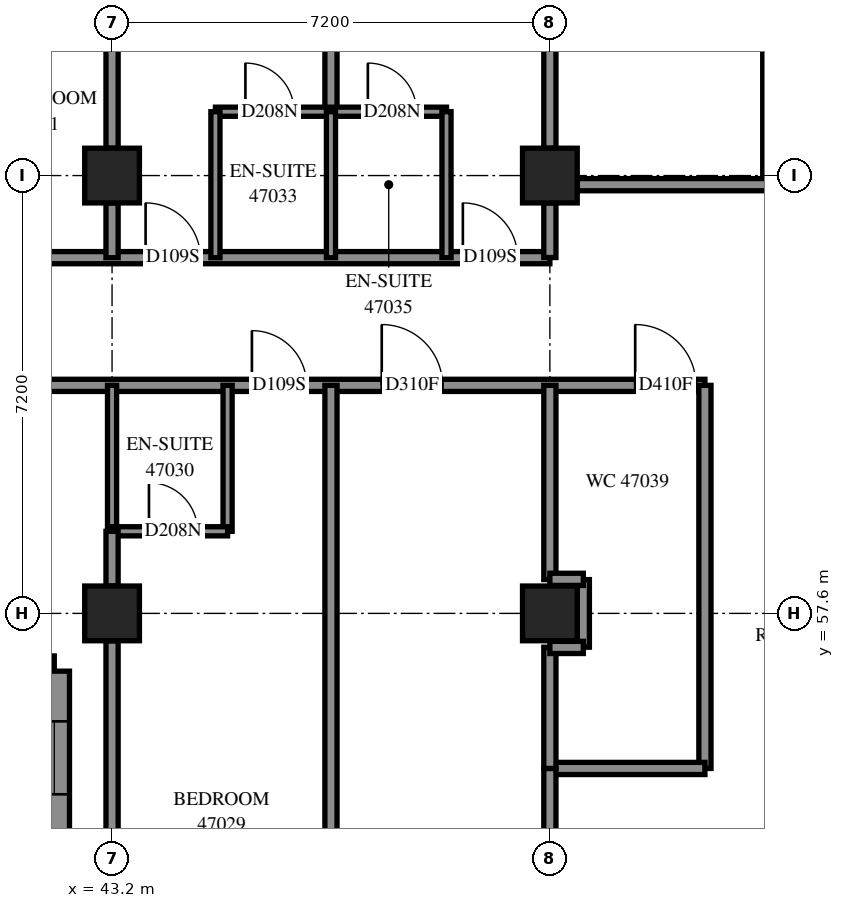
"""IFC4 building model, lengths in metres.
Left out: names, types, materials, properties, quantities, classifications, styles, units other than length and angle.
Written with IfcOpenShell. Run it as: python <this file> out.ifc"""

import sys

from ifc_helpers import new_model, si_unit, direction, frame, frame_2d, origin, origin_2d, place, context, subcontext, project, spatial, polyline, rectangle, outline, extrude, element, fill, save


model = new_model("IFC4")
c1 = context("Model", 3, precision=1e-05, world=origin(), true_north=direction((0.0, 1.0)))
c2 = subcontext(c1, "Body", "Model", "MODEL_VIEW")
j1 = project(units=[si_unit("LENGTHUNIT", "METRE"), si_unit("PLANEANGLEUNIT", "RADIAN")], contexts=[c1])
p1 = place(None, origin())
s1 = spatial("IfcSite", under=j1, at=p1, CompositionType="ELEMENT")
p2 = place(p1, origin())
s2 = spatial("IfcBuilding", under=s1, at=p2, CompositionType="ELEMENT")
p3 = place(p2, frame((0.0, 0.0, 172.8)))
s3 = spatial("IfcBuildingStorey", under=s2, at=p3, CompositionType="ELEMENT", Elevation=172.8)
for number, where, z_axis, x_axis in (
    (1, (43.2, 57.6, 0.0), (0.0, 0.0, 1.0), (1.0, 0.0, 0.0)),
    (2, (43.2, 64.8, 0.0), (0.0, 0.0, 1.0), (1.0, 0.0, 0.0)),
    (3, (50.4, 57.6, 0.0), (0.0, 0.0, 1.0), (1.0, 0.0, 0.0)),
    (4, (50.4, 64.8, 0.0), (0.0, 0.0, 1.0), (1.0, 0.0, 0.0)),
):
    element("IfcColumn", number, at=place(p3, frame(where, z_axis=z_axis, x_axis=x_axis)), inside=s3, PredefinedType="COLUMN", context=c2, shape_type="SweptSolid", body=[
        extrude(rectangle(XDim=0.9, YDim=0.9, at=origin_2d()), origin(), (0.0, 0.0, 1.0), 3.1),
    ])
p4 = place(p3, frame((35.05, 56.65, 0.0), z_axis=(0.0, 0.0, 1.0), x_axis=(1.0, 0.0, 0.0)))
e5 = element("IfcWall", 5, at=p4, inside=s3, PredefinedType="SOLIDWALL", context=c2, shape_type="SweptSolid", body=[
    extrude(outline(polyline([(-0.25, -0.25), (6.95, -0.25), (7.45, 0.25), (0.25, 0.25), (-0.25, -0.25)])), origin(), (0.0, 0.0, 1.0), 3.1),
])
p5 = place(p4, frame((1.35, 0.0, 0.45)))
e6 = element("IfcOpeningElement", 6, at=p5, cuts=e5, PredefinedType="OPENING", context=c2, shape_type="SweptSolid", body=[
    extrude(rectangle(XDim=2.8, YDim=2.5, at=frame_2d((1.4, 1.25))), frame((0.0, 0.26, 0.0), z_axis=(0.0, -1.0, 0.0), x_axis=(1.0, 0.0, 0.0)), (0.0, 0.0, 1.0), 0.52),
])
p6 = place(p4, frame((5.175, 0.0, 0.45)))
e7 = element("IfcOpeningElement", 7, at=p6, cuts=e5, PredefinedType="OPENING", context=c2, shape_type="SweptSolid", body=[
    extrude(rectangle(XDim=1.2, YDim=2.5, at=frame_2d((0.6, 1.25))), frame((0.0, 0.26, 0.0), z_axis=(0.0, -1.0, 0.0), x_axis=(1.0, 0.0, 0.0)), (0.0, 0.0, 1.0), 0.52),
])
p7 = place(p3, frame((42.25, 56.65, 0.0), z_axis=(0.0, 0.0, 1.0), x_axis=(0.0, -1.0, 0.0)))
e8 = element("IfcWall", 8, at=p7, inside=s3, PredefinedType="SOLIDWALL", context=c2, shape_type="SweptSolid", body=[
    extrude(outline(polyline([(0.25, -0.25), (7.45, -0.25), (6.95, 0.25), (-0.25, 0.25), (0.25, -0.25)])), origin(), (0.0, 0.0, 1.0), 3.1),
])
p8 = place(p7, frame((3.05, 0.0, 0.45)))
e9 = element("IfcOpeningElement", 9, at=p8, cuts=e8, PredefinedType="OPENING", context=c2, shape_type="SweptSolid", body=[
    extrude(rectangle(XDim=2.8, YDim=2.5, at=frame_2d((1.4, 1.25))), frame((0.0, 0.26, 0.0), z_axis=(0.0, -1.0, 0.0), x_axis=(1.0, 0.0, 0.0)), (0.0, 0.0, 1.0), 0.52),
])
p9 = place(p7, frame((0.825, 0.0, 0.45)))
e10 = element("IfcOpeningElement", 10, at=p9, cuts=e8, PredefinedType="OPENING", context=c2, shape_type="SweptSolid", body=[
    extrude(rectangle(XDim=1.2, YDim=2.5, at=frame_2d((0.6, 1.25))), frame((0.0, 0.26, 0.0), z_axis=(0.0, -1.0, 0.0), x_axis=(1.0, 0.0, 0.0)), (0.0, 0.0, 1.0), 0.52),
])
p10 = place(p3, frame((36.0, 61.35, 0.0), z_axis=(0.0, 0.0, 1.0), x_axis=(1.0, 0.0, 0.0)))
e11 = element("IfcWall", 11, at=p10, inside=s3, PredefinedType="PARTITIONING", context=c2, shape_type="SweptSolid", body=[
    extrude(rectangle(XDim=16.95, YDim=0.2, at=frame_2d((8.475, 0.0))), origin(), (0.0, 0.0, 1.0), 3.1),
])
p11 = place(p10, frame((2.3, 0.0, 0.0)))
e12 = element("IfcOpeningElement", 12, at=p11, cuts=e11, PredefinedType="OPENING", context=c2, shape_type="SweptSolid", body=[
    extrude(rectangle(XDim=0.9, YDim=2.1, at=frame_2d((0.45, 1.05))), frame((0.0, 0.11, 0.0), z_axis=(0.0, -1.0, 0.0), x_axis=(1.0, 0.0, 0.0)), (0.0, 0.0, 1.0), 0.22),
])
p12 = place(p10, frame((4.125, 0.0, 0.0)))
e13 = element("IfcOpeningElement", 13, at=p12, cuts=e11, PredefinedType="OPENING", context=c2, shape_type="SweptSolid", body=[
    extrude(rectangle(XDim=1.0, YDim=2.1, at=frame_2d((0.5, 1.05))), frame((0.0, 0.11, 0.0), z_axis=(0.0, -1.0, 0.0), x_axis=(1.0, 0.0, 0.0)), (0.0, 0.0, 1.0), 0.22),
])
p13 = place(p10, frame((9.5, 0.0, 0.0)))
e14 = element("IfcOpeningElement", 14, at=p13, cuts=e11, PredefinedType="OPENING", context=c2, shape_type="SweptSolid", body=[
    extrude(rectangle(XDim=0.9, YDim=2.1, at=frame_2d((0.45, 1.05))), frame((0.0, 0.11, 0.0), z_axis=(0.0, -1.0, 0.0), x_axis=(1.0, 0.0, 0.0)), (0.0, 0.0, 1.0), 0.22),
])
p14 = place(p10, frame((11.635, 0.0, 0.0)))
e15 = element("IfcOpeningElement", 15, at=p14, cuts=e11, PredefinedType="OPENING", context=c2, shape_type="SweptSolid", body=[
    extrude(rectangle(XDim=1.0, YDim=2.1, at=frame_2d((0.5, 1.05))), frame((0.0, 0.11, 0.0), z_axis=(0.0, -1.0, 0.0), x_axis=(1.0, 0.0, 0.0)), (0.0, 0.0, 1.0), 0.22),
])
p15 = place(p10, frame((15.803, 0.0, 0.0)))
e16 = element("IfcOpeningElement", 16, at=p15, cuts=e11, PredefinedType="OPENING", context=c2, shape_type="SweptSolid", body=[
    extrude(rectangle(XDim=1.0, YDim=2.1, at=frame_2d((0.5, 1.05))), frame((0.0, 0.11, 0.0), z_axis=(0.0, -1.0, 0.0), x_axis=(1.0, 0.0, 0.0)), (0.0, 0.0, 1.0), 0.22),
])
p16 = place(p3, frame((46.8, 49.7, 0.0), z_axis=(0.0, 0.0, 1.0), x_axis=(0.0, 1.0, 0.0)))
e17 = element("IfcWall", 17, at=p16, inside=s3, PredefinedType="PARTITIONING", context=c2, shape_type="SweptSolid", body=[
    extrude(rectangle(XDim=11.65, YDim=0.2, at=frame_2d((5.825, 0.0))), origin(), (0.0, 0.0, 1.0), 3.1),
])
p17 = place(p3, frame((40.65, 63.45, 0.0), z_axis=(0.0, 0.0, 1.0), x_axis=(1.0, 0.0, 0.0)))
e18 = element("IfcWall", 18, at=p17, inside=s3, PredefinedType="PARTITIONING", context=c2, shape_type="SweptSolid", body=[
    extrude(rectangle(XDim=9.75, YDim=0.2, at=frame_2d((4.875, 0.0))), origin(), (0.0, 0.0, 1.0), 3.1),
])
p18 = place(p17, frame((0.144, 0.0, 0.0)))
e19 = element("IfcOpeningElement", 19, at=p18, cuts=e18, PredefinedType="OPENING", context=c2, shape_type="SweptSolid", body=[
    extrude(rectangle(XDim=1.0, YDim=2.1, at=frame_2d((0.5, 1.05))), frame((0.0, 0.11, 0.0), z_axis=(0.0, -1.0, 0.0), x_axis=(1.0, 0.0, 0.0)), (0.0, 0.0, 1.0), 0.22),
])
p19 = place(p17, frame((3.102, 0.0, 0.0)))
e20 = element("IfcOpeningElement", 20, at=p19, cuts=e18, PredefinedType="OPENING", context=c2, shape_type="SweptSolid", body=[
    extrude(rectangle(XDim=0.9, YDim=2.1, at=frame_2d((0.45, 1.05))), frame((0.0, 0.11, 0.0), z_axis=(0.0, -1.0, 0.0), x_axis=(1.0, 0.0, 0.0)), (0.0, 0.0, 1.0), 0.22),
])
p20 = place(p17, frame((8.319, 0.0, 0.0)))
e21 = element("IfcOpeningElement", 21, at=p20, cuts=e18, PredefinedType="OPENING", context=c2, shape_type="SweptSolid", body=[
    extrude(rectangle(XDim=0.9, YDim=2.1, at=frame_2d((0.45, 1.05))), frame((0.0, 0.11, 0.0), z_axis=(0.0, -1.0, 0.0), x_axis=(1.0, 0.0, 0.0)), (0.0, 0.0, 1.0), 0.22),
])
p21 = place(p3, frame((54.0, 64.65, 0.0), z_axis=(0.0, 0.0, 1.0), x_axis=(0.0, 1.0, 0.0)))
e22 = element("IfcWall", 22, at=p21, inside=s3, PredefinedType="PARTITIONING", context=c2, shape_type="SweptSolid", body=[
    extrude(rectangle(XDim=8.126, YDim=0.2, at=frame_2d((4.063, 0.0))), origin(), (0.0, 0.0, 1.0), 3.1),
])
p22 = place(p3, frame((46.8, 65.85, 0.0), z_axis=(0.0, 0.0, 1.0), x_axis=(0.0, 1.0, 0.0)))
e23 = element("IfcWall", 23, at=p22, inside=s3, PredefinedType="PARTITIONING", context=c2, shape_type="SweptSolid", body=[
    extrude(rectangle(XDim=6.997, YDim=0.2, at=frame_2d((3.499, 0.0))), origin(), (0.0, 0.0, 1.0), 3.1),
])
p23 = place(p3, frame((52.95, 55.05, 0.0), z_axis=(0.0, 0.0, 1.0), x_axis=(0.0, 1.0, 0.0)))
e24 = element("IfcWall", 24, at=p23, inside=s3, PredefinedType="PARTITIONING", context=c2, shape_type="SweptSolid", body=[
    extrude(rectangle(XDim=6.3, YDim=0.2, at=frame_2d((3.15, 0.0))), origin(), (0.0, 0.0, 1.0), 3.1),
])
p24 = place(p3, frame((43.2, 50.85, 0.0), z_axis=(0.0, 0.0, 1.0), x_axis=(0.0, 1.0, 0.0)))
e25 = element("IfcWall", 25, at=p24, inside=s3, PredefinedType="PARTITIONING", context=c2, shape_type="SweptSolid", body=[
    extrude(rectangle(XDim=6.3, YDim=0.2, at=frame_2d((3.15, 0.0))), origin(), (0.0, 0.0, 1.0), 2.6),
])
for number, where, z_axis, x_axis in (
    (26, (43.2, 65.25, 0.0), (0.0, 0.0, 1.0), (0.0, 1.0, 0.0)),
    (27, (50.4, 65.25, 0.0), (0.0, 0.0, 1.0), (0.0, 1.0, 0.0)),
):
    element("IfcWall", number, at=place(p3, frame(where, z_axis=z_axis, x_axis=x_axis)), inside=s3, PredefinedType="PARTITIONING", context=c2, shape_type="SweptSolid", body=[
        extrude(rectangle(XDim=6.3, YDim=0.2, at=frame_2d((3.15, 0.0))), origin(), (0.0, 0.0, 1.0), 3.1),
    ])
p25 = place(p3, frame((50.85, 64.65, 0.0), z_axis=(0.0, 0.0, 1.0), x_axis=(1.0, 0.0, 0.0)))
e28 = element("IfcWall", 28, at=p25, inside=s3, PredefinedType="PARTITIONING", context=c2, shape_type="SweptSolid", body=[
    extrude(rectangle(XDim=4.65, YDim=0.2, at=frame_2d((2.325, 0.0))), origin(), (0.0, 0.0, 1.0), 3.1),
])
p26 = place(p25, frame((3.509, 0.0, 0.0)))
e29 = element("IfcOpeningElement", 29, at=p26, cuts=e28, PredefinedType="OPENING", context=c2, shape_type="SweptSolid", body=[
    extrude(rectangle(XDim=1.0, YDim=2.1, at=frame_2d((0.5, 1.05))), frame((0.0, 0.11, 0.0), z_axis=(0.0, -1.0, 0.0), x_axis=(1.0, 0.0, 0.0)), (0.0, 0.0, 1.0), 0.22),
])
p27 = place(p3, frame((44.9, 65.85, 0.0), z_axis=(0.0, 0.0, 1.0), x_axis=(1.0, 0.0, 0.0)))
e30 = element("IfcWall", 30, at=p27, inside=s3, PredefinedType="PARTITIONING", context=c2, shape_type="SweptSolid", body=[
    extrude(rectangle(XDim=3.8, YDim=0.15, at=frame_2d((1.9, 0.0))), origin(), (0.0, 0.0, 1.0), 3.1),
])
p28 = place(p27, frame((0.493, 0.0, 0.0)))
e31 = element("IfcOpeningElement", 31, at=p28, cuts=e30, PredefinedType="OPENING", context=c2, shape_type="SweptSolid", body=[
    extrude(rectangle(XDim=0.8, YDim=2.1, at=frame_2d((0.4, 1.05))), frame((0.0, 0.085, 0.0), z_axis=(0.0, -1.0, 0.0), x_axis=(1.0, 0.0, 0.0)), (0.0, 0.0, 1.0), 0.17),
])
p29 = place(p27, frame((2.507, 0.0, 0.0)))
e32 = element("IfcOpeningElement", 32, at=p29, cuts=e30, PredefinedType="OPENING", context=c2, shape_type="SweptSolid", body=[
    extrude(rectangle(XDim=0.8, YDim=2.1, at=frame_2d((0.4, 1.05))), frame((0.0, 0.085, 0.0), z_axis=(0.0, -1.0, 0.0), x_axis=(1.0, 0.0, 0.0)), (0.0, 0.0, 1.0), 0.17),
])
p30 = place(p3, frame((50.4, 58.156, 0.0), z_axis=(0.0, 0.0, 1.0), x_axis=(0.0, 1.0, 0.0)))
e33 = element("IfcWall", 33, at=p30, inside=s3, PredefinedType="PARTITIONING", context=c2, shape_type="SweptSolid", body=[
    extrude(rectangle(XDim=3.194, YDim=0.2, at=frame_2d((1.597, 0.0))), origin(), (0.0, 0.0, 1.0), 3.1),
])
p31 = place(p3, frame((50.4, 55.05, 0.0), z_axis=(0.0, 0.0, 1.0), x_axis=(1.0, 0.0, 0.0)))
e34 = element("IfcWall", 34, at=p31, inside=s3, PredefinedType="PARTITIONING", context=c2, shape_type="SweptSolid", body=[
    extrude(rectangle(XDim=2.55, YDim=0.2, at=frame_2d((1.275, 0.0))), origin(), (0.0, 0.0, 1.0), 3.1),
])
for number, where, z_axis, x_axis in (
    (35, (45.1, 58.95, 0.0), (0.0, 0.0, 1.0), (0.0, 1.0, 0.0)),
    (36, (43.2, 58.95, 0.0), (0.0, 0.0, 1.0), (0.0, 1.0, 0.0)),
    (37, (44.9, 63.45, 0.0), (0.0, 0.0, 1.0), (0.0, 1.0, 0.0)),
    (38, (46.8, 63.45, 0.0), (0.0, 0.0, 1.0), (0.0, 1.0, 0.0)),
    (39, (48.7, 63.45, 0.0), (0.0, 0.0, 1.0), (0.0, 1.0, 0.0)),
):
    element("IfcWall", number, at=place(p3, frame(where, z_axis=z_axis, x_axis=x_axis)), inside=s3, PredefinedType="PARTITIONING", context=c2, shape_type="SweptSolid", body=[
        extrude(rectangle(XDim=2.4, YDim=0.15, at=frame_2d((1.2, 0.0))), origin(), (0.0, 0.0, 1.0), 3.1),
    ])
p32 = place(p3, frame((50.4, 52.95, 0.0), z_axis=(0.0, 0.0, 1.0), x_axis=(0.0, 1.0, 0.0)))
e40 = element("IfcWall", 40, at=p32, inside=s3, PredefinedType="PARTITIONING", context=c2, shape_type="SweptSolid", body=[
    extrude(rectangle(XDim=2.1, YDim=0.2, at=frame_2d((1.05, 0.0))), origin(), (0.0, 0.0, 1.0), 3.1),
])
p33 = place(p3, frame((50.4, 55.05, 0.0), z_axis=(0.0, 0.0, 1.0), x_axis=(0.0, 1.0, 0.0)))
e41 = element("IfcWall", 41, at=p33, inside=s3, PredefinedType="PARTITIONING", context=c2, shape_type="SweptSolid", body=[
    extrude(rectangle(XDim=1.994, YDim=0.2, at=frame_2d((0.997, 0.0))), origin(), (0.0, 0.0, 1.0), 3.1),
])
p34 = place(p3, frame((43.2, 58.95, 0.0), z_axis=(0.0, 0.0, 1.0), x_axis=(1.0, 0.0, 0.0)))
e42 = element("IfcWall", 42, at=p34, inside=s3, PredefinedType="PARTITIONING", context=c2, shape_type="SweptSolid", body=[
    extrude(rectangle(XDim=1.9, YDim=0.15, at=frame_2d((0.95, 0.0))), origin(), (0.0, 0.0, 1.0), 3.1),
])
p35 = place(p34, frame((0.607, 0.0, 0.0)))
e43 = element("IfcOpeningElement", 43, at=p35, cuts=e42, PredefinedType="OPENING", context=c2, shape_type="SweptSolid", body=[
    extrude(rectangle(XDim=0.8, YDim=2.1, at=frame_2d((0.4, 1.05))), frame((0.0, 0.085, 0.0), z_axis=(0.0, -1.0, 0.0), x_axis=(1.0, 0.0, 0.0)), (0.0, 0.0, 1.0), 0.17),
])
p36 = place(p3, frame((50.95, 57.044, 0.0), z_axis=(0.0, 0.0, 1.0), x_axis=(0.0, 1.0, 0.0)))
e44 = element("IfcWall", 44, at=p36, inside=s3, PredefinedType="PARTITIONING", context=c2, shape_type="SweptSolid", body=[
    extrude(rectangle(XDim=1.112, YDim=0.2, at=frame_2d((0.556, 0.0))), origin(), (0.0, 0.0, 1.0), 3.1),
])
for number, where, z_axis, x_axis in (
    (45, (43.2, 58.05, 0.0), (0.0, 0.0, 1.0), (0.0, 1.0, 0.0)),
    (46, (43.2, 63.45, 0.0), (0.0, 0.0, 1.0), (0.0, 1.0, 0.0)),
):
    element("IfcWall", number, at=place(p3, frame(where, z_axis=z_axis, x_axis=x_axis)), inside=s3, PredefinedType="PARTITIONING", context=c2, shape_type="SweptSolid", body=[
        extrude(rectangle(XDim=0.9, YDim=0.2, at=frame_2d((0.45, 0.0))), origin(), (0.0, 0.0, 1.0), 3.1),
    ])
p37 = place(p3, frame((50.4, 63.452, 0.0), z_axis=(0.0, 0.0, 1.0), x_axis=(0.0, 1.0, 0.0)))
e47 = element("IfcWall", 47, at=p37, inside=s3, PredefinedType="PARTITIONING", context=c2, shape_type="SweptSolid", body=[
    extrude(rectangle(XDim=0.898, YDim=0.2, at=frame_2d((0.449, 0.0))), origin(), (0.0, 0.0, 1.0), 3.1),
])
for number, where, z_axis, x_axis in (
    (48, (50.4, 58.16, 0.0), (0.0, 0.0, 1.0), (1.0, 0.0, 0.0)),
    (49, (50.4, 57.04, 0.0), (0.0, 0.0, 1.0), (1.0, 0.0, 0.0)),
):
    element("IfcWall", number, at=place(p3, frame(where, z_axis=z_axis, x_axis=x_axis)), inside=s3, PredefinedType="PARTITIONING", context=c2, shape_type="SweptSolid", body=[
        extrude(rectangle(XDim=0.55, YDim=0.2, at=frame_2d((0.275, 0.0))), origin(), (0.0, 0.0, 1.0), 3.1),
    ])
p38 = place(p9, origin())
e50 = element("IfcWindow", 50, at=p38, inside=s3, PartitioningType="SINGLE_PANEL", PredefinedType="WINDOW", context=c2, shape_type="SweptSolid", body=[
    extrude(rectangle(XDim=1.2, YDim=2.5, at=frame_2d((0.6, 1.25))), frame((0.0, 0.18, 0.0), z_axis=(0.0, -1.0, 0.0), x_axis=(1.0, 0.0, 0.0)), (0.0, 0.0, 1.0), 0.06),
])
fill(e10, e50)
p39 = place(p13, origin())
e51 = element("IfcDoor", 51, at=p39, inside=s3, OperationType="SINGLE_SWING_LEFT", PredefinedType="DOOR", context=c2, shape_type="SweptSolid", body=[
    extrude(rectangle(XDim=0.9, YDim=2.1, at=frame_2d((0.45, 1.05))), frame((0.0, 0.025, 0.0), z_axis=(0.0, -1.0, 0.0), x_axis=(1.0, 0.0, 0.0)), (0.0, 0.0, 1.0), 0.05),
])
fill(e14, e51)
p40 = place(p35, origin())
e52 = element("IfcDoor", 52, at=p40, inside=s3, OperationType="SINGLE_SWING_RIGHT", PredefinedType="DOOR", context=c2, shape_type="SweptSolid", body=[
    extrude(rectangle(XDim=0.8, YDim=2.1, at=frame_2d((0.4, 1.05))), frame((0.0, 0.025, 0.0), z_axis=(0.0, -1.0, 0.0), x_axis=(1.0, 0.0, 0.0)), (0.0, 0.0, 1.0), 0.05),
])
fill(e43, e52)
p41 = place(p19, origin())
e53 = element("IfcDoor", 53, at=p41, inside=s3, OperationType="SINGLE_SWING_RIGHT", PredefinedType="DOOR", context=c2, shape_type="SweptSolid", body=[
    extrude(rectangle(XDim=0.9, YDim=2.1, at=frame_2d((0.45, 1.05))), frame((0.0, 0.025, 0.0), z_axis=(0.0, -1.0, 0.0), x_axis=(1.0, 0.0, 0.0)), (0.0, 0.0, 1.0), 0.05),
])
fill(e20, e53)
p42 = place(p28, origin())
e54 = element("IfcDoor", 54, at=p42, inside=s3, OperationType="SINGLE_SWING_RIGHT", PredefinedType="DOOR", context=c2, shape_type="SweptSolid", body=[
    extrude(rectangle(XDim=0.8, YDim=2.1, at=frame_2d((0.4, 1.05))), frame((0.0, 0.025, 0.0), z_axis=(0.0, -1.0, 0.0), x_axis=(1.0, 0.0, 0.0)), (0.0, 0.0, 1.0), 0.05),
])
fill(e31, e54)
p43 = place(p20, origin())
e55 = element("IfcDoor", 55, at=p43, inside=s3, OperationType="SINGLE_SWING_LEFT", PredefinedType="DOOR", context=c2, shape_type="SweptSolid", body=[
    extrude(rectangle(XDim=0.9, YDim=2.1, at=frame_2d((0.45, 1.05))), frame((0.0, 0.025, 0.0), z_axis=(0.0, -1.0, 0.0), x_axis=(1.0, 0.0, 0.0)), (0.0, 0.0, 1.0), 0.05),
])
fill(e21, e55)
p44 = place(p29, origin())
e56 = element("IfcDoor", 56, at=p44, inside=s3, OperationType="SINGLE_SWING_RIGHT", PredefinedType="DOOR", context=c2, shape_type="SweptSolid", body=[
    extrude(rectangle(XDim=0.8, YDim=2.1, at=frame_2d((0.4, 1.05))), frame((0.0, 0.025, 0.0), z_axis=(0.0, -1.0, 0.0), x_axis=(1.0, 0.0, 0.0)), (0.0, 0.0, 1.0), 0.05),
])
fill(e32, e56)
p45 = place(p14, origin())
e57 = element("IfcDoor", 57, at=p45, inside=s3, OperationType="SINGLE_SWING_RIGHT", PredefinedType="DOOR", context=c2, shape_type="SweptSolid", body=[
    extrude(rectangle(XDim=1.0, YDim=2.1, at=frame_2d((0.5, 1.05))), frame((0.0, 0.025, 0.0), z_axis=(0.0, -1.0, 0.0), x_axis=(1.0, 0.0, 0.0)), (0.0, 0.0, 1.0), 0.05),
])
fill(e15, e57)
p46 = place(p15, origin())
e58 = element("IfcDoor", 58, at=p46, inside=s3, OperationType="SINGLE_SWING_LEFT", PredefinedType="DOOR", context=c2, shape_type="SweptSolid", body=[
    extrude(rectangle(XDim=1.0, YDim=2.1, at=frame_2d((0.5, 1.05))), frame((0.0, 0.025, 0.0), z_axis=(0.0, -1.0, 0.0), x_axis=(1.0, 0.0, 0.0)), (0.0, 0.0, 1.0), 0.05),
])
fill(e16, e58)
save(model, sys.argv[1])
